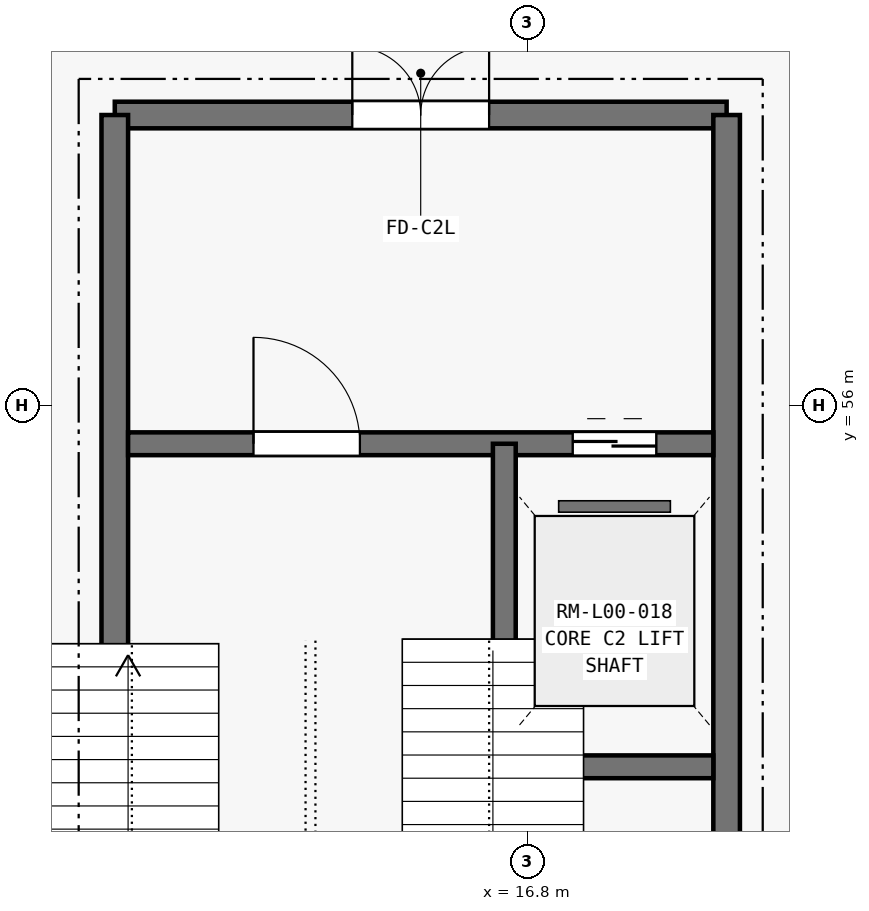
"""IFC4 building model, lengths in metres.
Left out: names, types, materials, properties, quantities, classifications, styles, units other than length and angle.
Written with IfcOpenShell. Run it as: python <this file> out.ifc"""

import sys

from ifc_helpers import new_model, si_unit, direction, frame, frame_2d, origin, place, context, subcontext, project, spatial, rectangle, extrude, element, fill, save


model = new_model("IFC4")
c1 = context("Model", 3, precision=1e-05, world=origin(), true_north=direction((0.0, 1.0)))
c2 = subcontext(c1, "Body", "Model", "MODEL_VIEW")
j1 = project(units=[si_unit("LENGTHUNIT", "METRE"), si_unit("PLANEANGLEUNIT", "RADIAN")], contexts=[c1])
p1 = place(None, origin())
s1 = spatial("IfcSite", under=j1, at=p1, CompositionType="ELEMENT")
p2 = place(p1, origin())
s2 = spatial("IfcBuilding", under=s1, at=p2, CompositionType="ELEMENT")
p3 = place(p2, origin())
s3 = spatial("IfcBuildingStorey", under=s2, at=p3, CompositionType="ELEMENT", Elevation=0.0)
p4 = place(p3, frame((11.375, 59.825, 0.0), z_axis=(0.0, 0.0, 1.0), x_axis=(1.0, 0.0, 0.0)))
e1 = element("IfcWall", 1, at=p4, inside=s3, PredefinedType="SHEAR", context=c2, shape_type="SweptSolid", body=[
    extrude(rectangle(XDim=8.05, YDim=0.35, at=frame_2d((4.025, 0.0))), origin(), (0.0, 0.0, 1.0), 5.4),
])
p5 = place(p4, frame((3.125, 0.0, 0.0)))
e2 = element("IfcOpeningElement", 2, at=p5, cuts=e1, PredefinedType="OPENING", context=c2, shape_type="SweptSolid", body=[
    extrude(rectangle(XDim=1.8, YDim=2.25, at=frame_2d((0.9, 1.125))), frame((0.0, 0.185, 0.0), z_axis=(0.0, -1.0, 0.0), x_axis=(1.0, 0.0, 0.0)), (0.0, 0.0, 1.0), 0.37),
])
p6 = place(p3, frame((11.375, 44.975, 0.0), z_axis=(0.0, 0.0, 1.0), x_axis=(0.0, 1.0, 0.0)))
e3 = element("IfcWall", 3, at=p6, inside=s3, PredefinedType="SHEAR", context=c2, shape_type="SweptSolid", body=[
    extrude(rectangle(XDim=14.85, YDim=0.35, at=frame_2d((7.425, 0.0))), origin(), (0.0, 0.0, 1.0), 5.4),
])
p7 = place(p3, frame((19.425, 44.975, 0.0), z_axis=(0.0, 0.0, 1.0), x_axis=(0.0, 1.0, 0.0)))
e4 = element("IfcWall", 4, at=p7, inside=s3, PredefinedType="SHEAR", context=c2, shape_type="SweptSolid", body=[
    extrude(rectangle(XDim=14.85, YDim=0.35, at=frame_2d((7.425, 0.0))), origin(), (0.0, 0.0, 1.0), 5.4),
])
p8 = place(p7, frame((2.855, 0.0, 0.0)))
e5 = element("IfcOpeningElement", 5, at=p8, cuts=e4, PredefinedType="OPENING", context=c2, shape_type="SweptSolid", body=[
    extrude(rectangle(XDim=0.9, YDim=2.1, at=frame_2d((0.45, 1.05))), frame((0.0, 0.185, 0.0), z_axis=(0.0, -1.0, 0.0), x_axis=(1.0, 0.0, 0.0)), (0.0, 0.0, 1.0), 0.37),
])
p9 = place(p3, frame((11.55, 55.5, 0.0), z_axis=(0.0, 0.0, 1.0), x_axis=(1.0, 0.0, 0.0)))
e6 = element("IfcWall", 6, at=p9, inside=s3, PredefinedType="SHEAR", context=c2, shape_type="SweptSolid", body=[
    extrude(rectangle(XDim=7.7, YDim=0.3, at=frame_2d((3.85, 0.0))), origin(), (0.0, 0.0, 1.0), 5.4),
])
p10 = place(p9, frame((1.65, 0.0, 0.0)))
e7 = element("IfcOpeningElement", 7, at=p10, cuts=e6, PredefinedType="OPENING", context=c2, shape_type="SweptSolid", body=[
    extrude(rectangle(XDim=1.4, YDim=2.2, at=frame_2d((0.7, 1.1))), frame((0.0, 0.16, 0.0), z_axis=(0.0, -1.0, 0.0), x_axis=(1.0, 0.0, 0.0)), (0.0, 0.0, 1.0), 0.32),
])
p11 = place(p9, frame((5.85, 0.0, 0.0)))
e8 = element("IfcOpeningElement", 8, at=p11, cuts=e6, PredefinedType="OPENING", context=c2, shape_type="SweptSolid", body=[
    extrude(rectangle(XDim=1.1, YDim=2.2, at=frame_2d((0.55, 1.1))), frame((0.0, 0.16, 0.0), z_axis=(0.0, -1.0, 0.0), x_axis=(1.0, 0.0, 0.0)), (0.0, 0.0, 1.0), 0.32),
])
p12 = place(p3, frame((16.5, 45.15, 0.0), z_axis=(0.0, 0.0, 1.0), x_axis=(0.0, 1.0, 0.0)))
e9 = element("IfcWall", 9, at=p12, inside=s3, PredefinedType="SHEAR", context=c2, shape_type="SweptSolid", body=[
    extrude(rectangle(XDim=10.35, YDim=0.3, at=frame_2d((5.175, 0.0))), origin(), (0.0, 0.0, 1.0), 5.4),
])
p13 = place(p3, frame((16.65, 51.25, 0.0), z_axis=(0.0, 0.0, 1.0), x_axis=(1.0, 0.0, 0.0)))
e10 = element("IfcWall", 10, at=p13, inside=s3, PredefinedType="SHEAR", context=c2, shape_type="SweptSolid", body=[
    extrude(rectangle(XDim=2.6, YDim=0.3, at=frame_2d((1.3, 0.0))), origin(), (0.0, 0.0, 1.0), 5.4),
])
p14 = place(p3, frame((10.875, 52.4, 0.0), z_axis=(0.0, 0.0, 1.0), x_axis=(-1.0, 0.0, 0.0)))
e11 = element("IfcWall", 11, at=p14, inside=s3, PredefinedType="SOLIDWALL", context=c2, shape_type="SweptSolid", body=[
    extrude(rectangle(XDim=10.165, YDim=0.22, at=frame_2d((5.083, 0.0))), origin(), (0.0, 0.0, 1.0), 5.14),
])
p15 = place(p5, origin())
e12 = element("IfcDoor", 12, at=p15, inside=s3, OperationType="DOUBLE_DOOR_SINGLE_SWING", PredefinedType="DOOR", context=c2, shape_type="SweptSolid", body=[
    extrude(rectangle(XDim=1.8, YDim=2.25, at=frame_2d((0.9, 1.125))), frame((0.0, 0.025, 0.0), z_axis=(0.0, -1.0, 0.0), x_axis=(1.0, 0.0, 0.0)), (0.0, 0.0, 1.0), 0.05),
])
fill(e2, e12)
p16 = place(p10, origin())
e13 = element("IfcDoor", 13, at=p16, inside=s3, OperationType="SINGLE_SWING_LEFT", PredefinedType="DOOR", context=c2, shape_type="SweptSolid", body=[
    extrude(rectangle(XDim=1.4, YDim=2.2, at=frame_2d((0.7, 1.1))), frame((0.0, 0.025, 0.0), z_axis=(0.0, -1.0, 0.0), x_axis=(1.0, 0.0, 0.0)), (0.0, 0.0, 1.0), 0.05),
])
fill(e7, e13)
p17 = place(p11, origin())
e14 = element("IfcDoor", 14, at=p17, inside=s3, OperationType="SLIDING_TO_LEFT", PredefinedType="DOOR", context=c2, shape_type="SweptSolid", body=[
    extrude(rectangle(XDim=1.1, YDim=2.2, at=frame_2d((0.55, 1.1))), frame((0.0, 0.025, 0.0), z_axis=(0.0, -1.0, 0.0), x_axis=(1.0, 0.0, 0.0)), (0.0, 0.0, 1.0), 0.05),
])
fill(e8, e14)
save(model, sys.argv[1])
